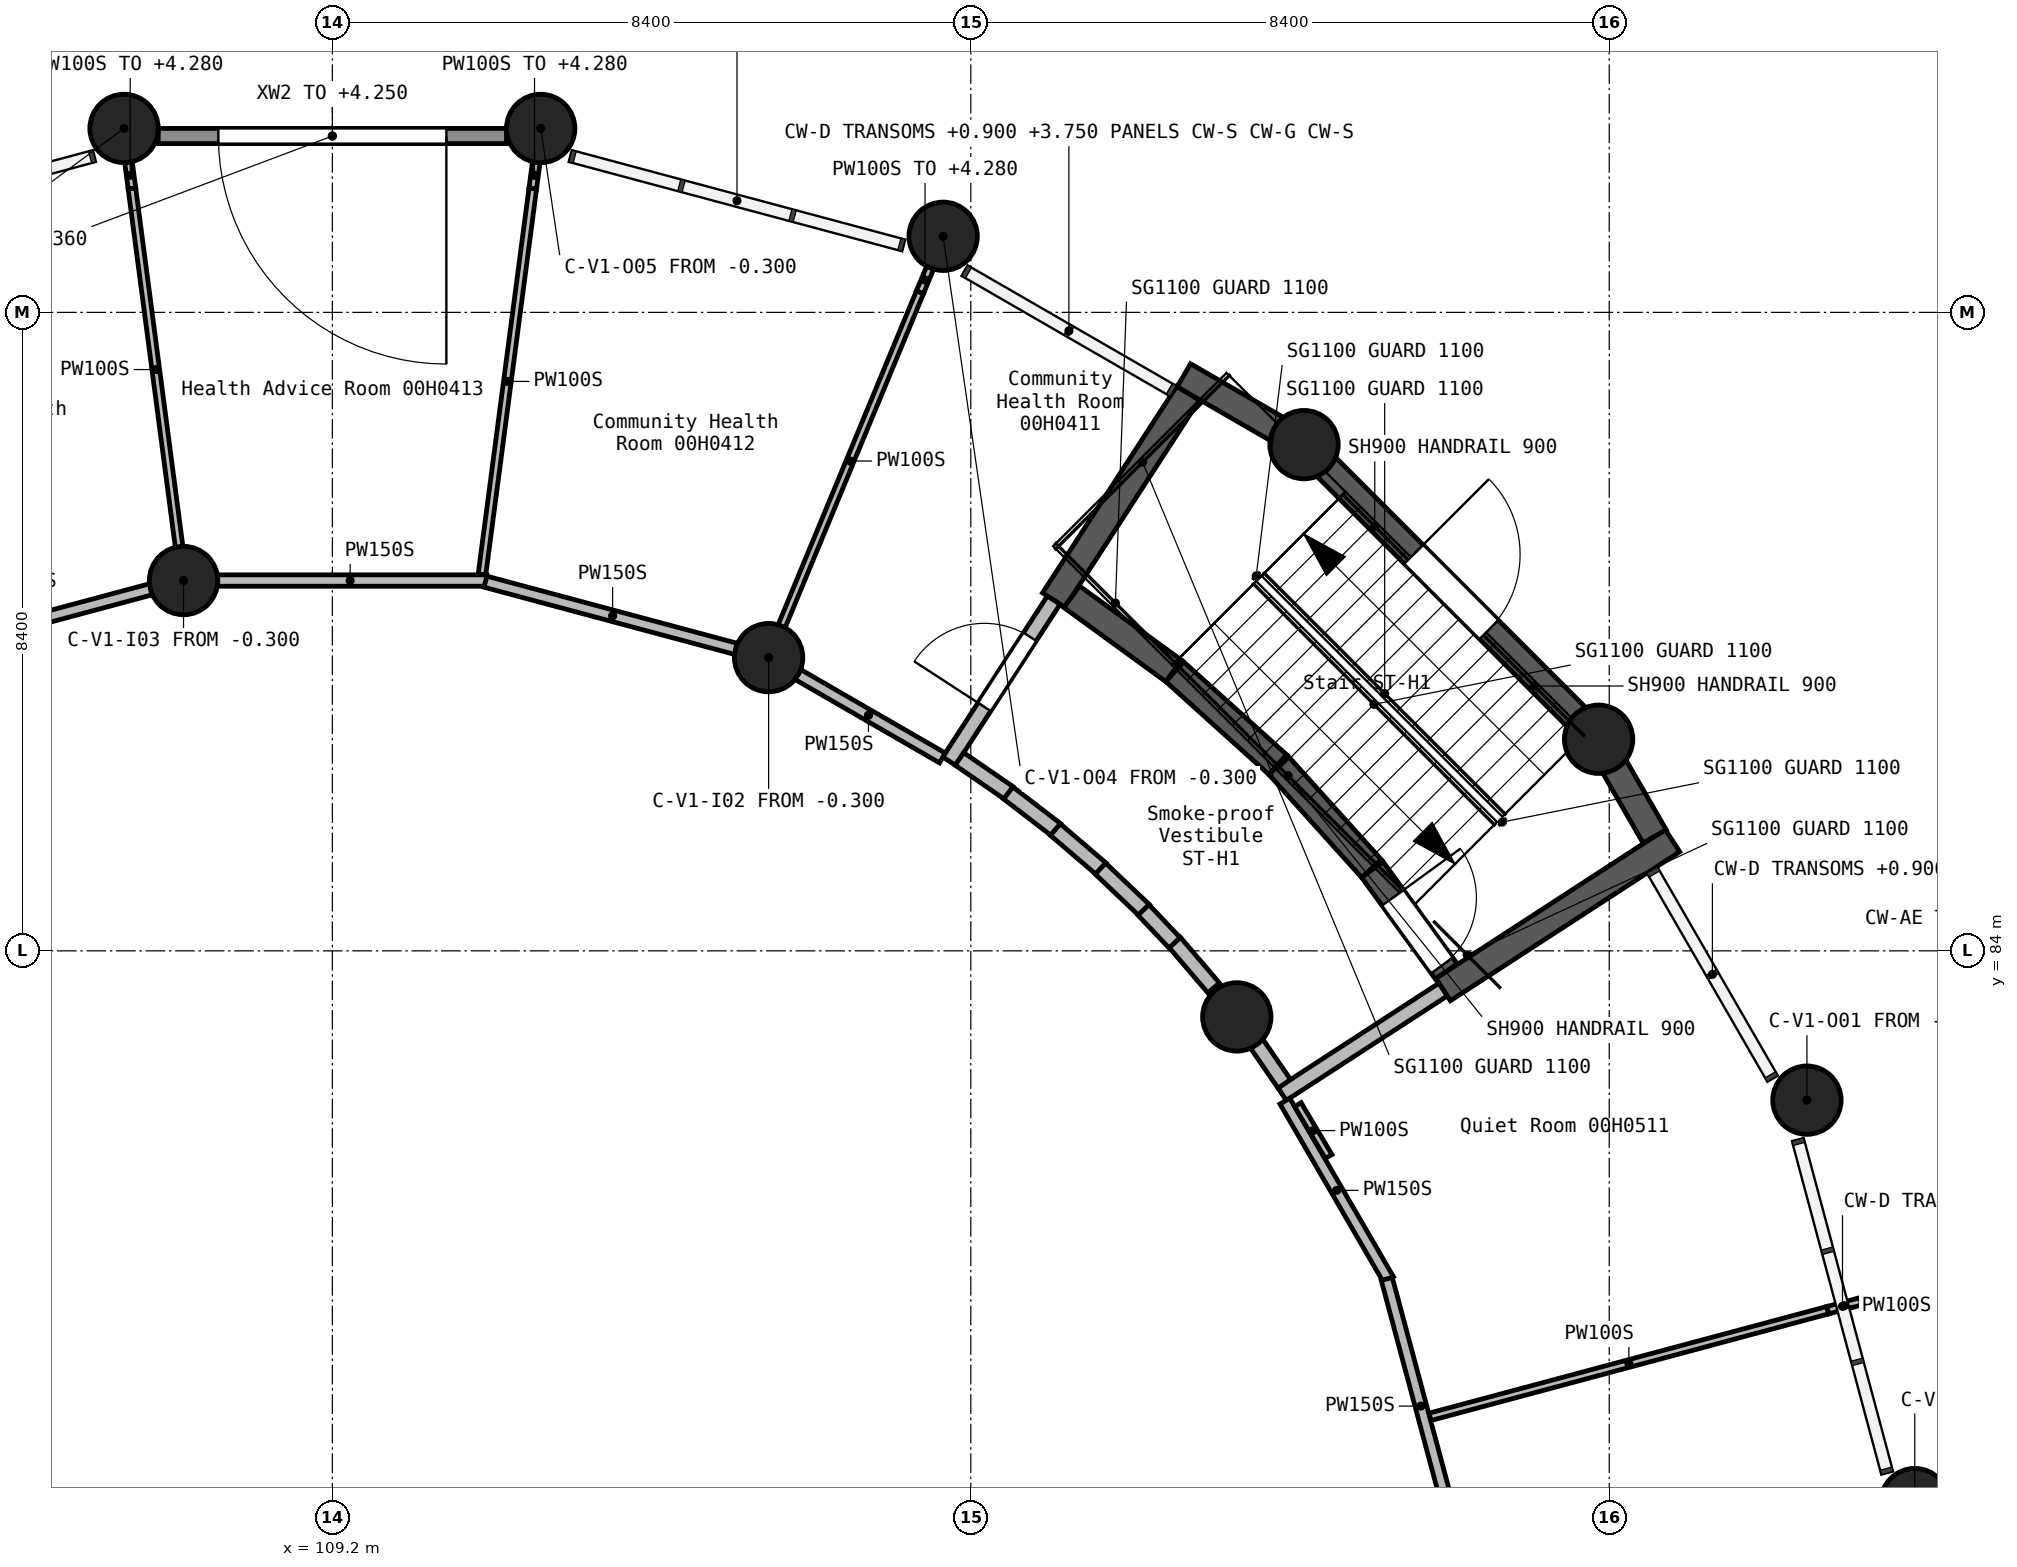
"""IFC4 building model, lengths in metres.
Left out: names, types, materials, properties, quantities, classifications, styles, units other than length and angle.
Written with IfcOpenShell. Run it as: python <this file> out.ifc"""

import sys

from ifc_helpers import new_model, si_unit, direction, frame, frame_2d, origin, origin_2d, place, context, subcontext, project, spatial, rectangle, circle, extrude, element, fill, save


model = new_model("IFC4")
c1 = context("Model", 3, precision=1e-05, world=origin(), true_north=direction((0.0, 1.0)))
c2 = subcontext(c1, "Body", "Model", "MODEL_VIEW")
j1 = project(units=[si_unit("LENGTHUNIT", "METRE"), si_unit("PLANEANGLEUNIT", "RADIAN")], contexts=[c1])
p1 = place(None, origin())
s1 = spatial("IfcSite", under=j1, at=p1, CompositionType="ELEMENT")
p2 = place(p1, origin())
s2 = spatial("IfcBuilding", under=s1, at=p2, CompositionType="ELEMENT")
p3 = place(p2, origin())
s3 = spatial("IfcBuildingStorey", under=s2, at=p3, CompositionType="ELEMENT", Elevation=0.0)
for number, where, z_axis, x_axis in (
    (1, (106.459, 94.82, -0.3), (0.0, 0.0, 1.0), (1.0, 0.0, 0.0)),
    (2, (107.242, 88.872, -0.3), (0.0, 0.0, 1.0), (1.0, 0.0, 0.0)),
    (3, (111.941, 94.82, -0.3), (0.0, 0.0, 1.0), (1.0, 0.0, 0.0)),
    (4, (114.94, 87.858, -0.3), (0.0, 0.0, 1.0), (1.0, 0.0, 0.0)),
    (5, (117.236, 93.401, -0.3), (0.0, 0.0, 1.0), (1.0, 0.0, 0.0)),
    (6, (121.1, 83.131, -0.3), (0.0, 0.0, 1.0), (1.0, 0.0, 0.0)),
    (7, (121.984, 90.66, -0.3), (0.0, 0.0, 1.0), (1.0, 0.0, 0.0)),
    (8, (125.86, 86.784, -0.3), (0.0, 0.0, 1.0), (1.0, 0.0, 0.0)),
    (9, (128.601, 82.036, -0.3), (0.0, 0.0, 1.0), (1.0, 0.0, 0.0)),
    (10, (130.02, 76.741, -0.3), (0.0, 0.0, 1.0), (1.0, 0.0, 0.0)),
):
    element("IfcColumn", number, at=place(p3, frame(where, z_axis=z_axis, x_axis=x_axis)), inside=s3, PredefinedType="COLUMN", context=c2, shape_type="SweptSolid", body=[
        extrude(circle(Radius=0.45, at=origin_2d()), origin(), (0.0, 0.0, 1.0), 5.7),
    ])
p4 = place(p3, frame((118.691, 88.614, -0.3), z_axis=(0.0, 0.0, 1.0), x_axis=(0.544668615038, 0.838651357712, 0.0)))
e11 = element("IfcWall", 11, at=p4, inside=s3, PredefinedType="SHEAR", context=c2, shape_type="SweptSolid", body=[
    extrude(rectangle(XDim=3.248, YDim=0.35, at=frame_2d((1.624, 0.0))), origin(), (0.0, 0.0, 1.0), 5.7),
])
p5 = place(p3, frame((118.927, 88.658, -0.3), z_axis=(0.0, 0.0, 1.0), x_axis=(0.808869786542, -0.587987813155, 0.0)))
e12 = element("IfcWall", 12, at=p5, inside=s3, PredefinedType="SHEAR", context=c2, shape_type="SweptSolid", body=[
    extrude(rectangle(XDim=1.658, YDim=0.35, at=frame_2d((0.829, 0.0))), origin(), (0.0, 0.0, 1.0), 5.7),
])
p6 = place(p3, frame((120.283, 87.672, -0.3), z_axis=(0.0, 0.0, 1.0), x_axis=(0.743081147279, -0.669201321397, 0.0)))
e13 = element("IfcWall", 13, at=p6, inside=s3, PredefinedType="SHEAR", context=c2, shape_type="SweptSolid", body=[
    extrude(rectangle(XDim=1.824, YDim=0.35, at=frame_2d((0.912, 0.0))), origin(), (0.0, 0.0, 1.0), 5.7),
])
p7 = place(p3, frame((120.404, 91.573, -0.3), z_axis=(0.0, 0.0, 1.0), x_axis=(0.866050214951, -0.499957023337, 0.0)))
e14 = element("IfcWall", 14, at=p7, inside=s3, PredefinedType="SHEAR", context=c2, shape_type="SweptSolid", body=[
    extrude(rectangle(XDim=1.802, YDim=0.35, at=frame_2d((0.901, 0.0))), origin(), (0.0, 0.0, 1.0), 5.7),
])
p8 = place(p3, frame((121.651, 86.438, -0.3), z_axis=(0.0, 0.0, 1.0), x_axis=(0.669201321397, -0.743081147279, 0.0)))
e15 = element("IfcWall", 15, at=p8, inside=s3, PredefinedType="SHEAR", context=c2, shape_type="SweptSolid", body=[
    extrude(rectangle(XDim=1.824, YDim=0.35, at=frame_2d((0.912, 0.0))), origin(), (0.0, 0.0, 1.0), 5.7),
])
p9 = place(p3, frame((122.0, 90.644, -0.3), z_axis=(0.0, 0.0, 1.0), x_axis=(0.707106781187, -0.707106781187, 0.0)))
e16 = element("IfcWall", 16, at=p9, inside=s3, PredefinedType="SHEAR", context=c2, shape_type="SweptSolid", body=[
    extrude(rectangle(XDim=5.436, YDim=0.35, at=frame_2d((2.718, 0.0))), origin(), (0.0, 0.0, 1.0), 5.7),
])
p10 = place(p9, frame((2.018, 0.0, 0.3)))
e17 = element("IfcOpeningElement", 17, at=p10, cuts=e16, PredefinedType="OPENING", context=c2, shape_type="SweptSolid", body=[
    extrude(rectangle(XDim=1.4, YDim=2.1, at=frame_2d((0.7, 1.05))), frame((0.0, 0.185, 0.0), z_axis=(0.0, -1.0, 0.0), x_axis=(1.0, 0.0, 0.0)), (0.0, 0.0, 1.0), 0.37),
])
p11 = place(p3, frame((122.883, 85.069, -0.3), z_axis=(0.0, 0.0, 1.0), x_axis=(0.587987813155, -0.808869786542, 0.0)))
e18 = element("IfcWall", 18, at=p11, inside=s3, PredefinedType="SHEAR", context=c2, shape_type="SweptSolid", body=[
    extrude(rectangle(XDim=1.658, YDim=0.35, at=frame_2d((0.829, 0.0))), origin(), (0.0, 0.0, 1.0), 5.7),
])
p12 = place(p11, frame((0.458, 0.0, 0.3)))
e19 = element("IfcOpeningElement", 19, at=p12, cuts=e18, PredefinedType="OPENING", context=c2, shape_type="SweptSolid", body=[
    extrude(rectangle(XDim=1.1, YDim=2.1, at=frame_2d((0.55, 1.05))), frame((0.0, 0.185, 0.0), z_axis=(0.0, -1.0, 0.0), x_axis=(1.0, 0.0, 0.0)), (0.0, 0.0, 1.0), 0.37),
])
p13 = place(p3, frame((123.814, 83.491, -0.3), z_axis=(0.0, 0.0, 1.0), x_axis=(0.838691576971, 0.544606682587, 0.0)))
e20 = element("IfcWall", 20, at=p13, inside=s3, PredefinedType="SHEAR", context=c2, shape_type="SweptSolid", body=[
    extrude(rectangle(XDim=3.598, YDim=0.35, at=frame_2d((1.799, 0.0))), origin(), (0.0, 0.0, 1.0), 5.7),
])
p14 = place(p3, frame((125.872, 86.764, -0.3), z_axis=(0.0, 0.0, 1.0), x_axis=(0.499882561262, -0.866093196455, 0.0)))
e21 = element("IfcWall", 21, at=p14, inside=s3, PredefinedType="SHEAR", context=c2, shape_type="SweptSolid", body=[
    extrude(rectangle(XDim=1.452, YDim=0.35, at=frame_2d((0.726, 0.0))), origin(), (0.0, 0.0, 1.0), 5.7),
])
p15 = place(p3, frame((111.491, 94.72, 0.0), z_axis=(0.0, 0.0, 1.0), x_axis=(-1.0, 0.0, 0.0)))
e22 = element("IfcWall", 22, at=p15, inside=s3, PredefinedType="STANDARD", context=c2, shape_type="SweptSolid", body=[
    extrude(rectangle(XDim=4.582, YDim=0.2, at=frame_2d((2.291, 0.0))), origin(), (0.0, 0.0, 1.0), 4.25),
])
p16 = place(p15, frame((0.791, 0.0, 0.0)))
e23 = element("IfcOpeningElement", 23, at=p16, cuts=e22, PredefinedType="OPENING", context=c2, shape_type="SweptSolid", body=[
    extrude(rectangle(XDim=3.0, YDim=2.4, at=frame_2d((1.5, 1.2))), frame((0.0, 0.11, 0.0), z_axis=(0.0, -1.0, 0.0), x_axis=(1.0, 0.0, 0.0)), (0.0, 0.0, 1.0), 0.22),
])
p17 = place(p3, frame((117.315, 86.496, 0.0), z_axis=(0.0, 0.0, 1.0), x_axis=(0.544553338247, 0.838726213853, 0.0)))
e24 = element("IfcWall", 24, at=p17, inside=s3, PredefinedType="SOLIDWALL", context=c2, shape_type="SweptSolid", body=[
    extrude(rectangle(XDim=2.525, YDim=0.2, at=frame_2d((1.263, 0.0))), origin(), (0.0, 0.0, 1.0), 5.05),
])
p18 = place(p17, frame((0.85, 0.0, 0.0)))
e25 = element("IfcOpeningElement", 25, at=p18, cuts=e24, PredefinedType="OPENING", context=c2, shape_type="SweptSolid", body=[
    extrude(rectangle(XDim=1.1, YDim=2.1, at=frame_2d((0.55, 1.05))), frame((0.0, 0.11, 0.0), z_axis=(0.0, -1.0, 0.0), x_axis=(1.0, 0.0, 0.0)), (0.0, 0.0, 1.0), 0.22),
])
p19 = place(p3, frame((121.696, 82.115, 0.0), z_axis=(0.0, 0.0, 1.0), x_axis=(0.838726213853, 0.544553338247, 0.0)))
e26 = element("IfcWall", 26, at=p19, inside=s3, PredefinedType="SOLIDWALL", context=c2, shape_type="SweptSolid", body=[
    extrude(rectangle(XDim=2.525, YDim=0.2, at=frame_2d((1.263, 0.0))), origin(), (0.0, 0.0, 1.0), 5.05),
])
p20 = place(p3, frame((121.335, 82.817, 0.0), z_axis=(0.0, 0.0, 1.0), x_axis=(0.56675458302, -0.823886668557, 0.0)))
e27 = element("IfcWall", 27, at=p20, inside=s3, PredefinedType="SOLIDWALL", context=c2, shape_type="SweptSolid", body=[
    extrude(rectangle(XDim=0.688, YDim=0.2, at=frame_2d((0.344, 0.0))), origin(), (0.0, 0.0, 1.0), 5.05),
])
p21 = place(p3, frame((117.45, 86.525, 0.0), z_axis=(0.0, 0.0, 1.0), x_axis=(0.823906287356, -0.566726062269, 0.0)))
e28 = element("IfcWall", 28, at=p21, inside=s3, PredefinedType="SOLIDWALL", context=c2, shape_type="SweptSolid", body=[
    extrude(rectangle(XDim=0.788, YDim=0.2, at=frame_2d((0.394, 0.0))), origin(), (0.0, 0.0, 1.0), 5.05),
])
for number, where, z_axis, x_axis in (
    (29, (118.092, 86.077, 0.0), (0.0, 0.0, 1.0), (0.793, -0.609, 0.0)),
    (30, (120.282, 84.113, 0.0), (0.0, 0.0, 1.0), (0.65, -0.76, 0.0)),
):
    element("IfcWall", number, at=place(p3, frame(where, z_axis=z_axis, x_axis=x_axis)), inside=s3, PredefinedType="SOLIDWALL", context=c2, shape_type="SweptSolid", body=[
        extrude(rectangle(XDim=0.79, YDim=0.2, at=frame_2d((0.395, 0.0))), origin(), (0.0, 0.0, 1.0), 5.05),
    ])
p22 = place(p3, frame((118.712, 85.595, 0.0), z_axis=(0.0, 0.0, 1.0), x_axis=(0.760389572583, -0.649467241597, 0.0)))
e31 = element("IfcWall", 31, at=p22, inside=s3, PredefinedType="SOLIDWALL", context=c2, shape_type="SweptSolid", body=[
    extrude(rectangle(XDim=0.79, YDim=0.2, at=frame_2d((0.395, 0.0))), origin(), (0.0, 0.0, 1.0), 5.05),
])
p23 = place(p3, frame((119.306, 85.082, 0.0), z_axis=(0.0, 0.0, 1.0), x_axis=(0.726001390363, -0.687693231893, 0.0)))
e32 = element("IfcWall", 32, at=p23, inside=s3, PredefinedType="SOLIDWALL", context=c2, shape_type="SweptSolid", body=[
    extrude(rectangle(XDim=0.79, YDim=0.2, at=frame_2d((0.395, 0.0))), origin(), (0.0, 0.0, 1.0), 5.05),
])
p24 = place(p3, frame((119.872, 84.538, 0.0), z_axis=(0.0, 0.0, 1.0), x_axis=(0.687562563481, -0.726125141624, 0.0)))
e33 = element("IfcWall", 33, at=p24, inside=s3, PredefinedType="SOLIDWALL", context=c2, shape_type="SweptSolid", body=[
    extrude(rectangle(XDim=0.595, YDim=0.2, at=frame_2d((0.298, 0.0))), origin(), (0.0, 0.0, 1.0), 5.05),
])
p25 = place(p3, frame((121.733, 82.023, 0.0), z_axis=(0.0, 0.0, 1.0), x_axis=(0.502063923765, -0.864830513138, 0.0)))
e34 = element("IfcWall", 34, at=p25, inside=s3, PredefinedType="PARTITIONING", context=c2, shape_type="SweptSolid", body=[
    extrude(rectangle(XDim=2.715, YDim=0.15, at=frame_2d((1.357, 0.0))), origin(), (0.0, 0.0, 1.0), 5.05),
])
p26 = place(p3, frame((107.635, 88.872, 0.0), z_axis=(0.0, 0.0, 1.0), x_axis=(1.0, 0.0, 0.0)))
e35 = element("IfcWall", 35, at=p26, inside=s3, PredefinedType="PARTITIONING", context=c2, shape_type="SweptSolid", body=[
    extrude(rectangle(XDim=3.598, YDim=0.15, at=frame_2d((1.799, 0.0))), origin(), (0.0, 0.0, 1.0), 5.05),
])
p27 = place(p3, frame((103.388, 87.839, 0.0), z_axis=(0.0, 0.0, 1.0), x_axis=(0.965887148397, 0.258963349841, 0.0)))
e36 = element("IfcWall", 36, at=p27, inside=s3, PredefinedType="PARTITIONING", context=c2, shape_type="SweptSolid", body=[
    extrude(rectangle(XDim=3.598, YDim=0.15, at=frame_2d((1.799, 0.0))), origin(), (0.0, 0.0, 1.0), 5.05),
])
p28 = place(p3, frame((111.214, 88.857, 0.0), z_axis=(0.0, 0.0, 1.0), x_axis=(0.965886698866, -0.258965026507, 0.0)))
e37 = element("IfcWall", 37, at=p28, inside=s3, PredefinedType="PARTITIONING", context=c2, shape_type="SweptSolid", body=[
    extrude(rectangle(XDim=3.465, YDim=0.15, at=frame_2d((1.732, 0.0))), origin(), (0.0, 0.0, 1.0), 5.05),
])
p29 = place(p3, frame((123.073, 79.684, 0.0), z_axis=(0.0, 0.0, 1.0), x_axis=(0.258947401773, -0.965891424082, 0.0)))
e38 = element("IfcWall", 38, at=p29, inside=s3, PredefinedType="PARTITIONING", context=c2, shape_type="SweptSolid", body=[
    extrude(rectangle(XDim=3.465, YDim=0.15, at=frame_2d((1.732, 0.0))), origin(), (0.0, 0.0, 1.0), 5.05),
])
p30 = place(p3, frame((115.28, 87.662, 0.0), z_axis=(0.0, 0.0, 1.0), x_axis=(0.865934083379, -0.500158138236, 0.0)))
e39 = element("IfcWall", 39, at=p30, inside=s3, PredefinedType="PARTITIONING", context=c2, shape_type="SweptSolid", body=[
    extrude(rectangle(XDim=2.247, YDim=0.15, at=frame_2d((1.124, 0.0))), origin(), (0.0, 0.0, 1.0), 5.05),
])
p31 = place(p3, frame((115.092, 88.224, 0.0), z_axis=(0.0, 0.0, 1.0), x_axis=(0.382670335106, 0.923884957465, 0.0)))
e40 = element("IfcWall", 40, at=p31, inside=s3, PredefinedType="PARTITIONING", context=c2, shape_type="SweptSolid", body=[
    extrude(rectangle(XDim=4.806, YDim=0.1, at=frame_2d((2.403, 0.0))), origin(), (0.0, 0.0, 1.0), 5.05),
])
p32 = place(p3, frame((116.931, 92.665, 0.0), z_axis=(0.0, 0.0, 1.0), x_axis=(0.383029543019, 0.923736092818, 0.0)))
e41 = element("IfcWall", 41, at=p32, inside=s3, PredefinedType="PARTITIONING", context=c2, shape_type="SweptSolid", body=[
    extrude(rectangle(XDim=0.35, YDim=0.1, at=frame_2d((0.175, 0.0))), origin(), (0.0, 0.0, 1.0), 4.28),
])
p33 = place(p3, frame((106.517, 94.377, 0.0), z_axis=(0.0, 0.0, 1.0), x_axis=(0.13038236842, -0.991463785524, 0.0)))
e42 = element("IfcWall", 42, at=p33, inside=s3, PredefinedType="PARTITIONING", context=c2, shape_type="SweptSolid", body=[
    extrude(rectangle(XDim=0.35, YDim=0.1, at=frame_2d((0.175, 0.0))), origin(), (0.0, 0.0, 1.0), 4.28),
])
p34 = place(p3, frame((106.563, 94.03, 0.0), z_axis=(0.0, 0.0, 1.0), x_axis=(0.130516279849, -0.991446166312, 0.0)))
e43 = element("IfcWall", 43, at=p34, inside=s3, PredefinedType="PARTITIONING", context=c2, shape_type="SweptSolid", body=[
    extrude(rectangle(XDim=4.805, YDim=0.1, at=frame_2d((2.403, 0.0))), origin(), (0.0, 0.0, 1.0), 5.05),
])
p35 = place(p3, frame((111.169, 88.953, 0.0), z_axis=(0.0, 0.0, 1.0), x_axis=(0.130505083023, 0.991447640224, 0.0)))
e44 = element("IfcWall", 44, at=p35, inside=s3, PredefinedType="PARTITIONING", context=c2, shape_type="SweptSolid", body=[
    extrude(rectangle(XDim=5.12, YDim=0.1, at=frame_2d((2.56, 0.0))), origin(), (0.0, 0.0, 1.0), 5.05),
])
p36 = place(p3, frame((111.837, 94.03, 0.0), z_axis=(0.0, 0.0, 1.0), x_axis=(0.131067654089, 0.991373426138, 0.0)))
e45 = element("IfcWall", 45, at=p36, inside=s3, PredefinedType="PARTITIONING", context=c2, shape_type="SweptSolid", body=[
    extrude(rectangle(XDim=0.35, YDim=0.1, at=frame_2d((0.175, 0.0))), origin(), (0.0, 0.0, 1.0), 4.28),
])
p37 = place(p3, frame((123.641, 77.869, 0.0), z_axis=(0.0, 0.0, 1.0), x_axis=(0.965887917043, 0.258960482912, 0.0)))
e46 = element("IfcWall", 46, at=p37, inside=s3, PredefinedType="PARTITIONING", context=c2, shape_type="SweptSolid", body=[
    extrude(rectangle(XDim=5.42, YDim=0.1, at=frame_2d((2.71, 0.0))), origin(), (0.0, 0.0, 1.0), 5.05),
])
p38 = place(p3, frame((128.876, 79.273, 0.0), z_axis=(0.0, 0.0, 1.0), x_axis=(0.966018295609, 0.258473697982, 0.0)))
e47 = element("IfcWall", 47, at=p38, inside=s3, PredefinedType="PARTITIONING", context=c2, shape_type="SweptSolid", body=[
    extrude(rectangle(XDim=0.45, YDim=0.1, at=frame_2d((0.225, 0.0))), origin(), (0.0, 0.0, 1.0), 4.28),
])
p39 = place(p3, frame((121.903, 81.977, 0.0), z_axis=(0.0, 0.0, 1.0), x_axis=(0.510737664175, -0.859736609894, 0.0)))
e48 = element("IfcWall", 48, at=p39, inside=s3, PredefinedType="PARTITIONING", context=c2, shape_type="SweptSolid", body=[
    extrude(rectangle(XDim=0.794, YDim=0.1, at=frame_2d((0.397, 0.0))), origin(), (0.0, 0.0, 1.0), 5.05),
])
p40 = place(p16, frame((3.0, 0.0, 0.0), z_axis=(0.0, 0.0, 1.0), x_axis=(-1.0, 0.0, 0.0)))
e49 = element("IfcDoor", 49, at=p40, inside=s3, OperationType="SINGLE_SWING_LEFT", PredefinedType="DOOR", context=c2, shape_type="SweptSolid", body=[
    extrude(rectangle(XDim=3.0, YDim=2.4, at=frame_2d((1.5, 1.2))), frame((0.0, 0.025, 0.0), z_axis=(0.0, -1.0, 0.0), x_axis=(1.0, 0.0, 0.0)), (0.0, 0.0, 1.0), 0.05),
])
fill(e23, e49)
p41 = place(p10, origin())
e50 = element("IfcDoor", 50, at=p41, inside=s3, OperationType="SINGLE_SWING_LEFT", PredefinedType="DOOR", context=c2, shape_type="SweptSolid", body=[
    extrude(rectangle(XDim=1.4, YDim=2.1, at=frame_2d((0.7, 1.05))), frame((0.0, 0.025, 0.0), z_axis=(0.0, -1.0, 0.0), x_axis=(1.0, 0.0, 0.0)), (0.0, 0.0, 1.0), 0.05),
])
fill(e17, e50)
p42 = place(p12, origin())
e51 = element("IfcDoor", 51, at=p42, inside=s3, OperationType="SINGLE_SWING_RIGHT", PredefinedType="DOOR", context=c2, shape_type="SweptSolid", body=[
    extrude(rectangle(XDim=1.1, YDim=2.1, at=frame_2d((0.55, 1.05))), frame((0.0, 0.025, 0.0), z_axis=(0.0, -1.0, 0.0), x_axis=(1.0, 0.0, 0.0)), (0.0, 0.0, 1.0), 0.05),
])
fill(e19, e51)
p43 = place(p18, frame((1.1, 0.0, 0.0), z_axis=(0.0, 0.0, 1.0), x_axis=(-1.0, 0.0, 0.0)))
e52 = element("IfcDoor", 52, at=p43, inside=s3, OperationType="SINGLE_SWING_LEFT", PredefinedType="DOOR", context=c2, shape_type="SweptSolid", body=[
    extrude(rectangle(XDim=1.1, YDim=2.1, at=frame_2d((0.55, 1.05))), frame((0.0, 0.025, 0.0), z_axis=(0.0, -1.0, 0.0), x_axis=(1.0, 0.0, 0.0)), (0.0, 0.0, 1.0), 0.05),
])
fill(e25, e52)
save(model, sys.argv[1])
